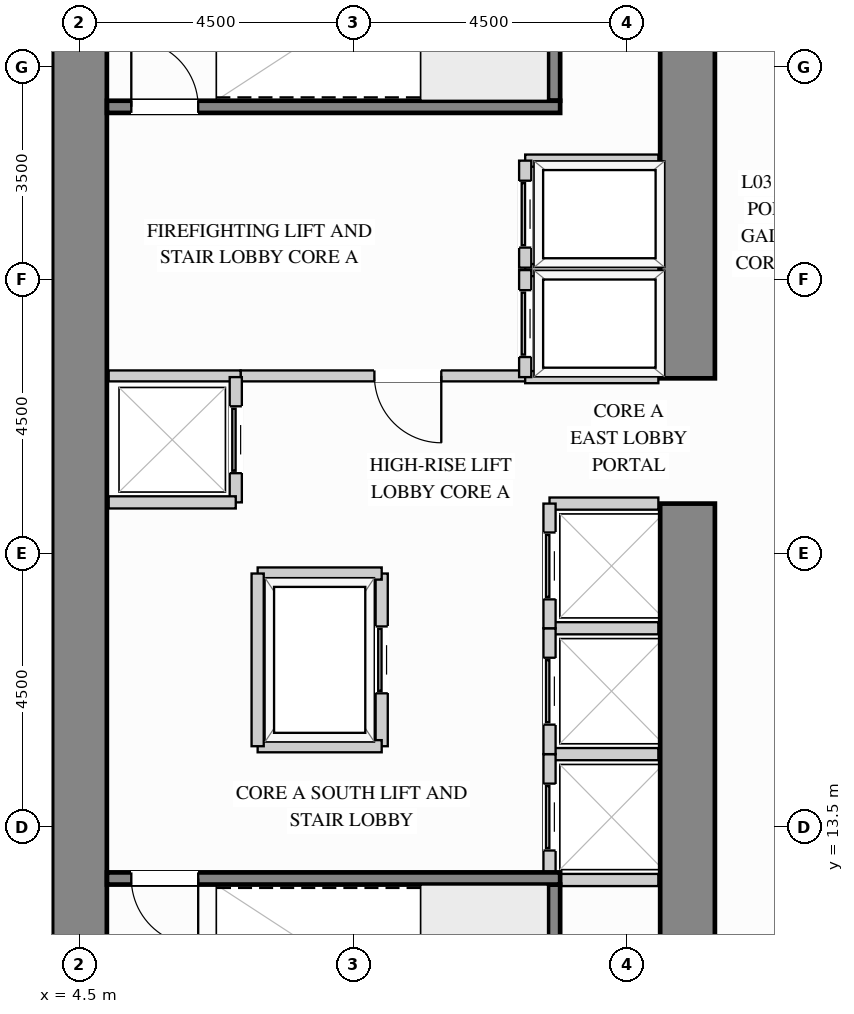
"""IFC4 building model, lengths in metres.
Left out: names, types, materials, properties, quantities, classifications, styles, units other than length and angle.
Written with IfcOpenShell. Run it as: python <this file> out.ifc"""

import sys

from ifc_helpers import new_model, si_unit, direction, frame, frame_2d, origin, place, context, subcontext, project, spatial, rectangle, extrude, source, transform, mapped, element, fill, save


model = new_model("IFC4")
c1 = context("Model", 3, precision=1e-05, world=origin(), true_north=direction((0.0, 1.0)))
c2 = subcontext(c1, "Body", "Model", "MODEL_VIEW")
j1 = project(units=[si_unit("LENGTHUNIT", "METRE"), si_unit("PLANEANGLEUNIT", "RADIAN")], contexts=[c1])
p1 = place(None, origin())
s1 = spatial("IfcSite", under=j1, at=p1, CompositionType="ELEMENT")
p2 = place(p1, origin())
s2 = spatial("IfcBuilding", under=s1, at=p2, CompositionType="ELEMENT")
p3 = place(p2, frame((0.0, 0.0, 13.5)))
s3 = spatial("IfcBuildingStorey", under=s2, at=p3, CompositionType="ELEMENT", Elevation=13.5)
m1 = source(origin(), c2, "Body", "SweptSolid", [
    extrude(rectangle(XDim=9.87, YDim=0.9, at=frame_2d((4.935, 0.0))), origin(), (0.0, 0.0, 1.0), 4.15),
])
p4 = place(p3, frame((14.5, 8.95, 0.0), z_axis=(0.0, 0.0, 1.0), x_axis=(0.0, 1.0, 0.0)))
e1 = element("IfcWall", 1, at=p4, inside=s3, PredefinedType="SHEAR", context=c2, shape_type="MappedRepresentation", body=[
    mapped(m1, transform((0.0, 0.0, 0.0), x_axis=(1.0, 0.0, 0.0), y_axis=(0.0, 1.0, 0.0), z_axis=(0.0, 0.0, 1.0))),
])
m2 = source(origin(), c2, "Body", "SweptSolid", [
    extrude(rectangle(XDim=8.17, YDim=0.9, at=frame_2d((4.085, 0.0))), origin(), (0.0, 0.0, 1.0), 4.15),
])
p5 = place(p3, frame((14.5, 20.88, 0.0), z_axis=(0.0, 0.0, 1.0), x_axis=(0.0, 1.0, 0.0)))
e2 = element("IfcWall", 2, at=p5, inside=s3, PredefinedType="SHEAR", context=c2, shape_type="MappedRepresentation", body=[
    mapped(m2, transform((0.0, 0.0, 0.0), x_axis=(1.0, 0.0, 0.0), y_axis=(0.0, 1.0, 0.0), z_axis=(0.0, 0.0, 1.0))),
])
m3 = source(origin(), c2, "Body", "SweptSolid", [
    extrude(rectangle(XDim=20.1, YDim=0.9, at=frame_2d((10.05, 0.0))), origin(), (0.0, 0.0, 1.0), 4.15),
])
p6 = place(p3, frame((4.5, 8.95, 0.0), z_axis=(0.0, 0.0, 1.0), x_axis=(0.0, 1.0, 0.0)))
e3 = element("IfcWall", 3, at=p6, inside=s3, PredefinedType="SHEAR", context=c2, shape_type="MappedRepresentation", body=[
    mapped(m3, transform((0.0, 0.0, 0.0), x_axis=(1.0, 0.0, 0.0), y_axis=(0.0, 1.0, 0.0), z_axis=(0.0, 0.0, 1.0))),
])
p7 = place(p3, frame((7.15, 20.92, 0.0), z_axis=(0.0, 0.0, 1.0), x_axis=(1.0, 0.0, 0.0)))
e4 = element("IfcWall", 4, at=p7, inside=s3, PredefinedType="PARTITIONING", context=c2, shape_type="SweptSolid", body=[
    extrude(rectangle(XDim=4.68, YDim=0.18, at=frame_2d((2.34, 0.0))), origin(), (0.0, 0.0, 1.0), 4.135),
])
p8 = place(p7, frame((2.2, 0.0, 0.0)))
e5 = element("IfcOpeningElement", 5, at=p8, cuts=e4, PredefinedType="OPENING", context=c2, shape_type="SweptSolid", body=[
    extrude(rectangle(XDim=1.1, YDim=2.15, at=frame_2d((0.55, 1.075))), frame((0.0, 0.1, 0.0), z_axis=(0.0, -1.0, 0.0), x_axis=(1.0, 0.0, 0.0)), (0.0, 0.0, 1.0), 0.2),
])
m4 = source(origin(), c2, "Body", "SweptSolid", [
    extrude(rectangle(XDim=2.17, YDim=0.18, at=frame_2d((1.085, 0.0))), origin(), (0.0, 0.0, 1.0), 4.135),
])
p9 = place(p3, frame((4.98, 20.92, 0.0), z_axis=(0.0, 0.0, 1.0), x_axis=(1.0, 0.0, 0.0)))
e6 = element("IfcWall", 6, at=p9, inside=s3, PredefinedType="PARTITIONING", context=c2, shape_type="MappedRepresentation", body=[
    mapped(m4, transform((0.0, 0.0, 0.0), x_axis=(1.0, 0.0, 0.0), y_axis=(0.0, 1.0, 0.0), z_axis=(0.0, 0.0, 1.0))),
])
m5 = source(origin(), c2, "Body", "SweptSolid", [
    extrude(rectangle(XDim=2.19, YDim=0.2, at=frame_2d((1.095, 0.0))), origin(), (0.0, 0.0, 1.0), 4.135),
])
for number, where, z_axis, x_axis in (
    (7, (11.83, 22.66, 0.0), (0.0, 0.0, 1.0), (1.0, 0.0, 0.0)),
    (8, (11.83, 20.9, 0.0), (0.0, 0.0, 1.0), (1.0, 0.0, 0.0)),
):
    element("IfcWall", number, at=place(p3, frame(where, z_axis=z_axis, x_axis=x_axis)), inside=s3, PredefinedType="PARTITIONING", context=c2, shape_type="MappedRepresentation", body=[
        mapped(m5, transform((0.0, 0.0, 0.0), x_axis=(1.0, 0.0, 0.0), y_axis=(0.0, 1.0, 0.0), z_axis=(0.0, 0.0, 1.0))),
    ])
p10 = place(p3, frame((11.83, 20.9, 0.0), z_axis=(0.0, 0.0, 1.0), x_axis=(0.0, 1.0, 0.0)))
e9 = element("IfcWall", 9, at=p10, inside=s3, PredefinedType="PARTITIONING", context=c2, shape_type="SweptSolid", body=[
    extrude(rectangle(XDim=1.76, YDim=0.2, at=frame_2d((0.88, 0.0))), origin(), (0.0, 0.0, 1.0), 4.135),
])
p11 = place(p10, frame((0.33, 0.0, 0.0)))
e10 = element("IfcOpeningElement", 10, at=p11, cuts=e9, PredefinedType="OPENING", context=c2, shape_type="SweptSolid", body=[
    extrude(rectangle(XDim=1.1, YDim=2.2, at=frame_2d((0.55, 1.1))), frame((0.0, 0.11, 0.0), z_axis=(0.0, -1.0, 0.0), x_axis=(1.0, 0.0, 0.0)), (0.0, 0.0, 1.0), 0.22),
])
p12 = place(p3, frame((11.83, 24.46, 0.0), z_axis=(0.0, 0.0, 1.0), x_axis=(1.0, 0.0, 0.0)))
e11 = element("IfcWall", 11, at=p12, inside=s3, PredefinedType="PARTITIONING", context=c2, shape_type="MappedRepresentation", body=[
    mapped(m5, transform((0.0, 0.0, 0.0), x_axis=(1.0, 0.0, 0.0), y_axis=(0.0, 1.0, 0.0), z_axis=(0.0, 0.0, 1.0))),
])
p13 = place(p3, frame((11.83, 22.7, 0.0), z_axis=(0.0, 0.0, 1.0), x_axis=(0.0, 1.0, 0.0)))
e12 = element("IfcWall", 12, at=p13, inside=s3, PredefinedType="PARTITIONING", context=c2, shape_type="SweptSolid", body=[
    extrude(rectangle(XDim=1.76, YDim=0.2, at=frame_2d((0.88, 0.0))), origin(), (0.0, 0.0, 1.0), 4.135),
])
p14 = place(p13, frame((0.33, 0.0, 0.0)))
e13 = element("IfcOpeningElement", 13, at=p14, cuts=e12, PredefinedType="OPENING", context=c2, shape_type="SweptSolid", body=[
    extrude(rectangle(XDim=1.1, YDim=2.2, at=frame_2d((0.55, 1.1))), frame((0.0, 0.11, 0.0), z_axis=(0.0, -1.0, 0.0), x_axis=(1.0, 0.0, 0.0)), (0.0, 0.0, 1.0), 0.22),
])
m6 = source(origin(), c2, "Body", "SweptSolid", [
    extrude(rectangle(XDim=1.79, YDim=0.2, at=frame_2d((0.895, 0.0))), origin(), (0.0, 0.0, 1.0), 4.135),
])
for number, where, z_axis, x_axis in (
    (14, (12.23, 14.7, 0.0), (0.0, 0.0, 1.0), (1.0, 0.0, 0.0)),
    (15, (12.23, 12.63, 0.0), (0.0, 0.0, 1.0), (1.0, 0.0, 0.0)),
):
    element("IfcWall", number, at=place(p3, frame(where, z_axis=z_axis, x_axis=x_axis)), inside=s3, PredefinedType="PARTITIONING", context=c2, shape_type="MappedRepresentation", body=[
        mapped(m6, transform((0.0, 0.0, 0.0), x_axis=(1.0, 0.0, 0.0), y_axis=(0.0, 1.0, 0.0), z_axis=(0.0, 0.0, 1.0))),
    ])
p15 = place(p3, frame((12.23, 12.63, 0.0), z_axis=(0.0, 0.0, 1.0), x_axis=(0.0, 1.0, 0.0)))
e16 = element("IfcWall", 16, at=p15, inside=s3, PredefinedType="PARTITIONING", context=c2, shape_type="SweptSolid", body=[
    extrude(rectangle(XDim=2.07, YDim=0.2, at=frame_2d((1.035, 0.0))), origin(), (0.0, 0.0, 1.0), 4.135),
])
p16 = place(p15, frame((0.485, 0.0, 0.0)))
e17 = element("IfcOpeningElement", 17, at=p16, cuts=e16, PredefinedType="OPENING", context=c2, shape_type="SweptSolid", body=[
    extrude(rectangle(XDim=1.1, YDim=2.2, at=frame_2d((0.55, 1.1))), frame((0.0, 0.11, 0.0), z_axis=(0.0, -1.0, 0.0), x_axis=(1.0, 0.0, 0.0)), (0.0, 0.0, 1.0), 0.22),
])
p17 = place(p3, frame((12.23, 16.77, 0.0), z_axis=(0.0, 0.0, 1.0), x_axis=(1.0, 0.0, 0.0)))
e18 = element("IfcWall", 18, at=p17, inside=s3, PredefinedType="PARTITIONING", context=c2, shape_type="MappedRepresentation", body=[
    mapped(m6, transform((0.0, 0.0, 0.0), x_axis=(1.0, 0.0, 0.0), y_axis=(0.0, 1.0, 0.0), z_axis=(0.0, 0.0, 1.0))),
])
p18 = place(p3, frame((12.23, 14.7, 0.0), z_axis=(0.0, 0.0, 1.0), x_axis=(0.0, 1.0, 0.0)))
e19 = element("IfcWall", 19, at=p18, inside=s3, PredefinedType="PARTITIONING", context=c2, shape_type="SweptSolid", body=[
    extrude(rectangle(XDim=2.07, YDim=0.2, at=frame_2d((1.035, 0.0))), origin(), (0.0, 0.0, 1.0), 4.135),
])
p19 = place(p18, frame((0.485, 0.0, 0.0)))
e20 = element("IfcOpeningElement", 20, at=p19, cuts=e19, PredefinedType="OPENING", context=c2, shape_type="SweptSolid", body=[
    extrude(rectangle(XDim=1.1, YDim=2.2, at=frame_2d((0.55, 1.1))), frame((0.0, 0.11, 0.0), z_axis=(0.0, -1.0, 0.0), x_axis=(1.0, 0.0, 0.0)), (0.0, 0.0, 1.0), 0.22),
])
p20 = place(p3, frame((12.23, 18.82, 0.0), z_axis=(0.0, 0.0, 1.0), x_axis=(1.0, 0.0, 0.0)))
e21 = element("IfcWall", 21, at=p20, inside=s3, PredefinedType="PARTITIONING", context=c2, shape_type="MappedRepresentation", body=[
    mapped(m6, transform((0.0, 0.0, 0.0), x_axis=(1.0, 0.0, 0.0), y_axis=(0.0, 1.0, 0.0), z_axis=(0.0, 0.0, 1.0))),
])
p21 = place(p3, frame((12.23, 16.77, 0.0), z_axis=(0.0, 0.0, 1.0), x_axis=(0.0, 1.0, 0.0)))
e22 = element("IfcWall", 22, at=p21, inside=s3, PredefinedType="PARTITIONING", context=c2, shape_type="SweptSolid", body=[
    extrude(rectangle(XDim=2.05, YDim=0.2, at=frame_2d((1.025, 0.0))), origin(), (0.0, 0.0, 1.0), 4.135),
])
p22 = place(p21, frame((0.475, 0.0, 0.0)))
e23 = element("IfcOpeningElement", 23, at=p22, cuts=e22, PredefinedType="OPENING", context=c2, shape_type="SweptSolid", body=[
    extrude(rectangle(XDim=1.1, YDim=2.2, at=frame_2d((0.55, 1.1))), frame((0.0, 0.11, 0.0), z_axis=(0.0, -1.0, 0.0), x_axis=(1.0, 0.0, 0.0)), (0.0, 0.0, 1.0), 0.22),
])
p23 = place(p3, frame((7.07, 18.84, 0.0), z_axis=(0.0, 0.0, 1.0), x_axis=(0.0, 1.0, 0.0)))
e24 = element("IfcWall", 24, at=p23, inside=s3, PredefinedType="PARTITIONING", context=c2, shape_type="SweptSolid", body=[
    extrude(rectangle(XDim=2.06, YDim=0.2, at=frame_2d((1.03, 0.0))), origin(), (0.0, 0.0, 1.0), 4.135),
])
p24 = place(p23, frame((0.48, 0.0, 0.0)))
e25 = element("IfcOpeningElement", 25, at=p24, cuts=e24, PredefinedType="OPENING", context=c2, shape_type="SweptSolid", body=[
    extrude(rectangle(XDim=1.1, YDim=2.2, at=frame_2d((0.55, 1.1))), frame((0.0, 0.11, 0.0), z_axis=(0.0, -1.0, 0.0), x_axis=(1.0, 0.0, 0.0)), (0.0, 0.0, 1.0), 0.22),
])
m7 = source(origin(), c2, "Body", "SweptSolid", [
    extrude(rectangle(XDim=2.09, YDim=0.2, at=frame_2d((1.045, 0.0))), origin(), (0.0, 0.0, 1.0), 4.135),
])
p25 = place(p3, frame((4.98, 18.84, 0.0), z_axis=(0.0, 0.0, 1.0), x_axis=(1.0, 0.0, 0.0)))
e26 = element("IfcWall", 26, at=p25, inside=s3, PredefinedType="PARTITIONING", context=c2, shape_type="MappedRepresentation", body=[
    mapped(m7, transform((0.0, 0.0, 0.0), x_axis=(1.0, 0.0, 0.0), y_axis=(0.0, 1.0, 0.0), z_axis=(0.0, 0.0, 1.0))),
])
p26 = place(p3, frame((9.47, 14.83, 0.0), z_axis=(0.0, 0.0, 1.0), x_axis=(0.0, 1.0, 0.0)))
e27 = element("IfcWall", 27, at=p26, inside=s3, PredefinedType="PARTITIONING", context=c2, shape_type="SweptSolid", body=[
    extrude(rectangle(XDim=2.84, YDim=0.2, at=frame_2d((1.42, 0.0))), origin(), (0.0, 0.0, 1.0), 4.135),
])
p27 = place(p26, frame((0.87, 0.0, 0.0)))
e28 = element("IfcOpeningElement", 28, at=p27, cuts=e27, PredefinedType="OPENING", context=c2, shape_type="SweptSolid", body=[
    extrude(rectangle(XDim=1.1, YDim=2.2, at=frame_2d((0.55, 1.1))), frame((0.0, 0.11, 0.0), z_axis=(0.0, -1.0, 0.0), x_axis=(1.0, 0.0, 0.0)), (0.0, 0.0, 1.0), 0.22),
])
m8 = source(origin(), c2, "Body", "SweptSolid", [
    extrude(rectangle(XDim=2.04, YDim=0.2, at=frame_2d((1.02, 0.0))), origin(), (0.0, 0.0, 1.0), 4.135),
])
for number, where, z_axis, x_axis in (
    (29, (7.43, 17.67, 0.0), (0.0, 0.0, 1.0), (1.0, 0.0, 0.0)),
    (30, (7.43, 14.83, 0.0), (0.0, 0.0, 1.0), (1.0, 0.0, 0.0)),
):
    element("IfcWall", number, at=place(p3, frame(where, z_axis=z_axis, x_axis=x_axis)), inside=s3, PredefinedType="PARTITIONING", context=c2, shape_type="MappedRepresentation", body=[
        mapped(m8, transform((0.0, 0.0, 0.0), x_axis=(1.0, 0.0, 0.0), y_axis=(0.0, 1.0, 0.0), z_axis=(0.0, 0.0, 1.0))),
    ])
m9 = source(origin(), c2, "Body", "SweptSolid", [
    extrude(rectangle(XDim=2.84, YDim=0.2, at=frame_2d((1.42, 0.0))), origin(), (0.0, 0.0, 1.0), 4.135),
])
p28 = place(p3, frame((7.43, 14.83, 0.0), z_axis=(0.0, 0.0, 1.0), x_axis=(0.0, 1.0, 0.0)))
e31 = element("IfcWall", 31, at=p28, inside=s3, PredefinedType="PARTITIONING", context=c2, shape_type="MappedRepresentation", body=[
    mapped(m9, transform((0.0, 0.0, 0.0), x_axis=(1.0, 0.0, 0.0), y_axis=(0.0, 1.0, 0.0), z_axis=(0.0, 0.0, 1.0))),
])
m10 = source(origin(), c2, "Body", "SweptSolid", [
    extrude(rectangle(XDim=3.603, YDim=0.2, at=frame_2d((1.802, 0.0))), origin(), (0.0, 0.0, 1.0), 4.15),
])
p29 = place(p3, frame((12.305, 8.952, 0.0), z_axis=(0.0, 0.0, 1.0), x_axis=(0.0, 1.0, 0.0)))
e32 = element("IfcWall", 32, at=p29, inside=s3, PredefinedType="SHEAR", context=c2, shape_type="MappedRepresentation", body=[
    mapped(m10, transform((0.0, 0.0, 0.0), x_axis=(1.0, 0.0, 0.0), y_axis=(0.0, 1.0, 0.0), z_axis=(0.0, 0.0, 1.0))),
])
p30 = place(p3, frame((4.952, 12.655, 0.0), z_axis=(0.0, 0.0, 1.0), x_axis=(1.0, 0.0, 0.0)))
e33 = element("IfcWall", 33, at=p30, inside=s3, PredefinedType="SHEAR", context=c2, shape_type="SweptSolid", body=[
    extrude(rectangle(XDim=7.453, YDim=0.2, at=frame_2d((3.727, 0.0))), origin(), (0.0, 0.0, 1.0), 4.15),
])
p31 = place(p30, frame((0.4, 0.0, 0.0)))
e34 = element("IfcOpeningElement", 34, at=p31, cuts=e33, PredefinedType="OPENING", context=c2, shape_type="SweptSolid", body=[
    extrude(rectangle(XDim=1.1, YDim=2.15, at=frame_2d((0.55, 1.075))), frame((0.0, 0.11, 0.0), z_axis=(0.0, -1.0, 0.0), x_axis=(1.0, 0.0, 0.0)), (0.0, 0.0, 1.0), 0.22),
])
p32 = place(p3, frame((12.305, 25.445, 0.0), z_axis=(0.0, 0.0, 1.0), x_axis=(0.0, 1.0, 0.0)))
e35 = element("IfcWall", 35, at=p32, inside=s3, PredefinedType="SHEAR", context=c2, shape_type="MappedRepresentation", body=[
    mapped(m10, transform((0.0, 0.0, 0.0), x_axis=(1.0, 0.0, 0.0), y_axis=(0.0, 1.0, 0.0), z_axis=(0.0, 0.0, 1.0))),
])
p33 = place(p3, frame((4.952, 25.345, 0.0), z_axis=(0.0, 0.0, 1.0), x_axis=(1.0, 0.0, 0.0)))
e36 = element("IfcWall", 36, at=p33, inside=s3, PredefinedType="SHEAR", context=c2, shape_type="SweptSolid", body=[
    extrude(rectangle(XDim=7.453, YDim=0.2, at=frame_2d((3.727, 0.0))), origin(), (0.0, 0.0, 1.0), 4.15),
])
p34 = place(p33, frame((0.4, 0.0, 0.0)))
e37 = element("IfcOpeningElement", 37, at=p34, cuts=e36, PredefinedType="OPENING", context=c2, shape_type="SweptSolid", body=[
    extrude(rectangle(XDim=1.1, YDim=2.15, at=frame_2d((0.55, 1.075))), frame((0.0, 0.11, 0.0), z_axis=(0.0, -1.0, 0.0), x_axis=(1.0, 0.0, 0.0)), (0.0, 0.0, 1.0), 0.22),
])
m11 = source(origin(), c2, "Body", "SweptSolid", [
    extrude(rectangle(XDim=1.1, YDim=2.15, at=frame_2d((0.55, 1.075))), frame((0.0, 0.025, 0.0), z_axis=(0.0, -1.0, 0.0), x_axis=(1.0, 0.0, 0.0)), (0.0, 0.0, 1.0), 0.05),
])
p35 = place(p8, origin())
e38 = element("IfcDoor", 38, at=p35, inside=s3, OperationType="SINGLE_SWING_RIGHT", PredefinedType="DOOR", context=c2, shape_type="MappedRepresentation", body=[
    mapped(m11, transform((0.0, 0.0, 0.0), x_axis=(1.0, 0.0, 0.0), y_axis=(0.0, 1.0, 0.0), z_axis=(0.0, 0.0, 1.0))),
])
fill(e5, e38)
m12 = source(origin(), c2, "Body", "SweptSolid", [
    extrude(rectangle(XDim=1.1, YDim=2.2, at=frame_2d((0.55, 1.1))), frame((0.0, 0.025, 0.0), z_axis=(0.0, -1.0, 0.0), x_axis=(1.0, 0.0, 0.0)), (0.0, 0.0, 1.0), 0.05),
])
p36 = place(p11, origin())
e39 = element("IfcDoor", 39, at=p36, inside=s3, OperationType="SLIDING_TO_LEFT", PredefinedType="DOOR", context=c2, shape_type="MappedRepresentation", body=[
    mapped(m12, transform((0.0, 0.0, 0.0), x_axis=(1.0, 0.0, 0.0), y_axis=(0.0, 1.0, 0.0), z_axis=(0.0, 0.0, 1.0))),
])
fill(e10, e39)
p37 = place(p14, origin())
e40 = element("IfcDoor", 40, at=p37, inside=s3, OperationType="SLIDING_TO_LEFT", PredefinedType="DOOR", context=c2, shape_type="MappedRepresentation", body=[
    mapped(m12, transform((0.0, 0.0, 0.0), x_axis=(1.0, 0.0, 0.0), y_axis=(0.0, 1.0, 0.0), z_axis=(0.0, 0.0, 1.0))),
])
fill(e13, e40)
p38 = place(p16, origin())
e41 = element("IfcDoor", 41, at=p38, inside=s3, OperationType="SLIDING_TO_LEFT", PredefinedType="DOOR", context=c2, shape_type="MappedRepresentation", body=[
    mapped(m12, transform((0.0, 0.0, 0.0), x_axis=(1.0, 0.0, 0.0), y_axis=(0.0, 1.0, 0.0), z_axis=(0.0, 0.0, 1.0))),
])
fill(e17, e41)
p39 = place(p19, origin())
e42 = element("IfcDoor", 42, at=p39, inside=s3, OperationType="SLIDING_TO_LEFT", PredefinedType="DOOR", context=c2, shape_type="MappedRepresentation", body=[
    mapped(m12, transform((0.0, 0.0, 0.0), x_axis=(1.0, 0.0, 0.0), y_axis=(0.0, 1.0, 0.0), z_axis=(0.0, 0.0, 1.0))),
])
fill(e20, e42)
p40 = place(p22, origin())
e43 = element("IfcDoor", 43, at=p40, inside=s3, OperationType="SLIDING_TO_LEFT", PredefinedType="DOOR", context=c2, shape_type="MappedRepresentation", body=[
    mapped(m12, transform((0.0, 0.0, 0.0), x_axis=(1.0, 0.0, 0.0), y_axis=(0.0, 1.0, 0.0), z_axis=(0.0, 0.0, 1.0))),
])
fill(e23, e43)
p41 = place(p24, origin())
e44 = element("IfcDoor", 44, at=p41, inside=s3, OperationType="SLIDING_TO_LEFT", PredefinedType="DOOR", context=c2, shape_type="MappedRepresentation", body=[
    mapped(m12, transform((0.0, 0.0, 0.0), x_axis=(1.0, 0.0, 0.0), y_axis=(0.0, 1.0, 0.0), z_axis=(0.0, 0.0, 1.0))),
])
fill(e25, e44)
p42 = place(p27, origin())
e45 = element("IfcDoor", 45, at=p42, inside=s3, OperationType="SLIDING_TO_LEFT", PredefinedType="DOOR", context=c2, shape_type="MappedRepresentation", body=[
    mapped(m12, transform((0.0, 0.0, 0.0), x_axis=(1.0, 0.0, 0.0), y_axis=(0.0, 1.0, 0.0), z_axis=(0.0, 0.0, 1.0))),
])
fill(e28, e45)
m13 = source(origin(), c2, "Body", "SweptSolid", [
    extrude(rectangle(XDim=1.1, YDim=2.15, at=frame_2d((0.55, 1.075))), frame((0.0, 0.025, 0.0), z_axis=(0.0, -1.0, 0.0), x_axis=(1.0, 0.0, 0.0)), (0.0, 0.0, 1.0), 0.05),
])
p43 = place(p31, origin())
e46 = element("IfcDoor", 46, at=p43, inside=s3, OperationType="SINGLE_SWING_RIGHT", PredefinedType="DOOR", context=c2, shape_type="MappedRepresentation", body=[
    mapped(m13, transform((0.0, 0.0, 0.0), x_axis=(1.0, 0.0, 0.0), y_axis=(0.0, 1.0, 0.0), z_axis=(0.0, 0.0, 1.0))),
])
fill(e34, e46)
p44 = place(p34, origin())
e47 = element("IfcDoor", 47, at=p44, inside=s3, OperationType="SINGLE_SWING_LEFT", PredefinedType="DOOR", context=c2, shape_type="MappedRepresentation", body=[
    mapped(m13, transform((0.0, 0.0, 0.0), x_axis=(1.0, 0.0, 0.0), y_axis=(0.0, 1.0, 0.0), z_axis=(0.0, 0.0, 1.0))),
])
fill(e37, e47)
save(model, sys.argv[1])
